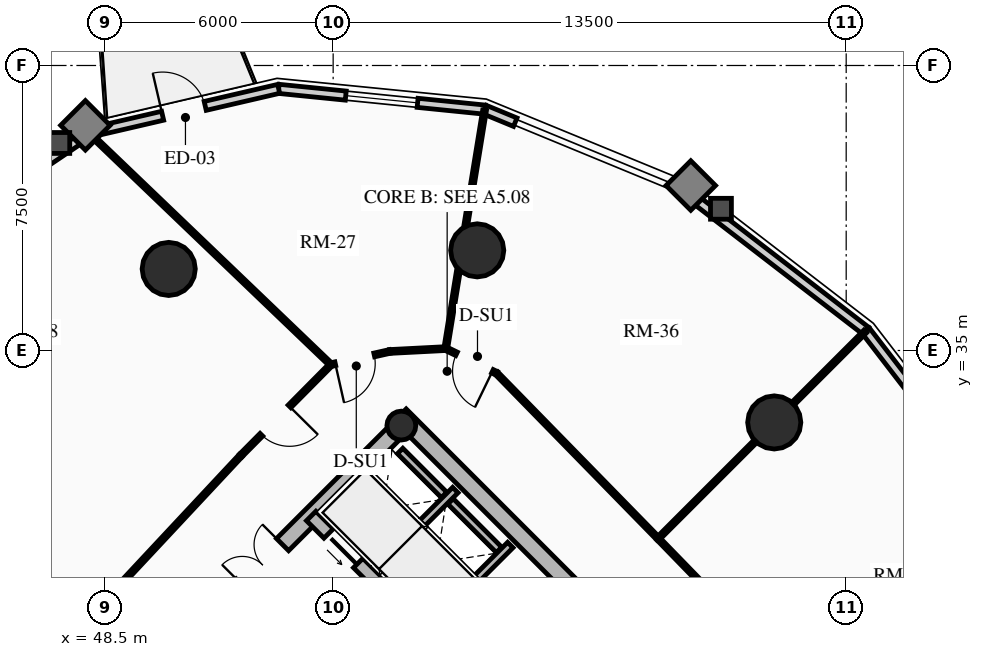
"""IFC4 building model, lengths in metres.
Left out: names, types, materials, properties, quantities, classifications, styles, units other than length and angle.
Written with IfcOpenShell. Run it as: python <this file> out.ifc"""

import sys

from ifc_helpers import new_model, si_unit, direction, frame, frame_2d, origin, origin_2d, place, context, subcontext, project, spatial, rectangle, circle, hollow_circle, extrude, source, transform, mapped, element, fill, save


model = new_model("IFC4")
c1 = context("Model", 3, precision=1e-05, world=origin(), true_north=direction((0.0, 1.0)))
c2 = subcontext(c1, "Body", "Model", "MODEL_VIEW")
j1 = project(units=[si_unit("LENGTHUNIT", "METRE"), si_unit("PLANEANGLEUNIT", "RADIAN")], contexts=[c1])
p1 = place(None, origin())
s1 = spatial("IfcSite", under=j1, at=p1, CompositionType="ELEMENT")
p2 = place(p1, origin())
s2 = spatial("IfcBuilding", under=s1, at=p2, CompositionType="ELEMENT")
p3 = place(p2, frame((0.0, 0.0, 102.16)))
s3 = spatial("IfcBuildingStorey", under=s2, at=p3, CompositionType="ELEMENT", Elevation=102.16)
p4 = place(p3, frame((66.303, 23.263, 0.0), z_axis=(0.0, 0.0, 1.0), x_axis=(-0.707106781187, 0.707106781187, 0.0)))
e1 = element("IfcWall", 1, at=p4, inside=s3, PredefinedType="SHEAR", context=c2, shape_type="SweptSolid", body=[
    extrude(rectangle(XDim=14.2, YDim=0.45, at=frame_2d((7.1, 0.0))), origin(), (0.0, 0.0, 1.0), 2.91),
])
p5 = place(p3, frame((48.856, 25.578, 0.0), z_axis=(0.0, 0.0, 1.0), x_axis=(0.707106781187, 0.707106781187, 0.0)))
e2 = element("IfcWall", 2, at=p5, inside=s3, PredefinedType="SHEAR", context=c2, shape_type="SweptSolid", body=[
    extrude(rectangle(XDim=10.7, YDim=0.45, at=frame_2d((5.35, 0.0))), origin(), (0.0, 0.0, 1.0), 2.91),
])
m1 = source(origin(), c2, "Body", "SweptSolid", [
    extrude(rectangle(XDim=1.5, YDim=2.02, at=frame_2d((0.75, 1.01))), frame((0.0, 0.235, 0.0), z_axis=(0.0, -1.0, 0.0), x_axis=(1.0, 0.0, 0.0)), (0.0, 0.0, 1.0), 0.47),
])
p6 = place(p5, frame((4.6, 0.0, 0.0)))
e3 = element("IfcOpeningElement", 3, at=p6, cuts=e2, PredefinedType="OPENING", context=c2, shape_type="MappedRepresentation", body=[
    mapped(m1, transform((0.0, 0.0, 0.0), x_axis=(1.0, 0.0, 0.0), y_axis=(0.0, 1.0, 0.0), z_axis=(0.0, 0.0, 1.0), scale=1.0)),
])
p7 = place(p3, frame((63.645, 20.922, 0.0), z_axis=(0.0, 0.0, 1.0), x_axis=(-0.707106781187, 0.707106781187, 0.0)))
e4 = element("IfcWall", 4, at=p7, inside=s3, PredefinedType="SHEAR", context=c2, shape_type="SweptSolid", body=[
    extrude(rectangle(XDim=13.75, YDim=0.35, at=frame_2d((6.875, 0.0))), origin(), (0.0, 0.0, 1.0), 2.91),
])
m2 = source(origin(), c2, "Body", "SweptSolid", [
    extrude(rectangle(XDim=1.1, YDim=2.015, at=frame_2d((0.55, 1.007))), frame((0.0, 0.185, 0.0), z_axis=(0.0, -1.0, 0.0), x_axis=(1.0, 0.0, 0.0)), (0.0, 0.0, 1.0), 0.37),
])
p8 = place(p7, frame((10.0, 0.0, 0.0)))
e5 = element("IfcOpeningElement", 5, at=p8, cuts=e4, PredefinedType="OPENING", context=c2, shape_type="MappedRepresentation", body=[
    mapped(m2, transform((0.0, 0.0, 0.0), x_axis=(1.0, 0.0, 0.0), y_axis=(0.0, 1.0, 0.0), z_axis=(0.0, 0.0, 1.0), scale=1.0)),
])
p9 = place(p7, frame((12.0, 0.0, 0.0)))
e6 = element("IfcOpeningElement", 6, at=p9, cuts=e4, PredefinedType="OPENING", context=c2, shape_type="MappedRepresentation", body=[
    mapped(m2, transform((0.0, 0.0, 0.0), x_axis=(1.0, 0.0, 0.0), y_axis=(0.0, 1.0, 0.0), z_axis=(0.0, 0.0, 1.0), scale=1.0)),
])
m3 = source(origin(), c2, "Body", "SweptSolid", [
    extrude(rectangle(XDim=1.15, YDim=2.02, at=frame_2d((0.575, 1.01))), frame((0.0, 0.185, 0.0), z_axis=(0.0, -1.0, 0.0), x_axis=(1.0, 0.0, 0.0)), (0.0, 0.0, 1.0), 0.37),
])
p10 = place(p7, frame((5.305, 0.0, 0.0)))
e7 = element("IfcOpeningElement", 7, at=p10, cuts=e4, PredefinedType="OPENING", context=c2, shape_type="MappedRepresentation", body=[
    mapped(m3, transform((0.0, 0.0, 0.0), x_axis=(1.0, 0.0, 0.0), y_axis=(0.0, 1.0, 0.0), z_axis=(0.0, 0.0, 1.0), scale=1.0)),
])
p11 = place(p3, frame((56.294, 33.024, 0.0), z_axis=(0.0, 0.0, 1.0), x_axis=(0.707106781187, 0.707106781187, 0.0)))
e8 = element("IfcColumn", 8, at=p11, inside=s3, PredefinedType="COLUMN", context=c2, shape_type="SweptSolid", body=[
    extrude(hollow_circle(Radius=0.38, WallThickness=0.032, at=origin_2d()), origin(), (0.0, 0.0, 1.0), 2.91),
])
for number, where, z_axis, x_axis in (
    (9, (66.107, 33.107, 0.0), (0.0, 0.0, 1.0), (1.0, 0.0, 0.0)),
    (10, (58.291, 37.635, 0.0), (0.0, 0.0, 1.0), (1.0, 0.0, 0.0)),
    (11, (50.173, 37.146, 0.0), (0.0, 0.0, 1.0), (1.0, 0.0, 0.0)),
):
    element("IfcColumn", number, at=place(p3, frame(where, z_axis=z_axis, x_axis=x_axis)), inside=s3, PredefinedType="USERDEFINED", context=c2, shape_type="SweptSolid", body=[
        extrude(circle(Radius=0.7, at=origin_2d()), origin(), (0.0, 0.0, 1.0), 2.91),
    ])
p12 = place(p3, frame((63.811, 39.145, 0.0), z_axis=(0.0, 0.0, 1.0), x_axis=(0.791982052206, -0.61054437102, 0.0)))
e12 = element("IfcWall", 12, at=p12, inside=s3, PredefinedType="SOLIDWALL", context=c2, shape_type="SweptSolid", body=[
    extrude(rectangle(XDim=5.942, YDim=0.24, at=frame_2d((2.971, 0.0))), origin(), (0.0, 0.0, 1.0), 2.179),
])
p13 = place(p3, frame((58.487, 41.339, 0.0), z_axis=(0.0, 0.0, 1.0), x_axis=(0.924556017656, -0.381046152345, 0.0)))
e13 = element("IfcWall", 13, at=p13, inside=s3, PredefinedType="SOLIDWALL", context=c2, shape_type="SweptSolid", body=[
    extrude(rectangle(XDim=0.87, YDim=0.24, at=frame_2d((0.435, 0.0))), origin(), (0.0, 0.0, 1.0), 2.179),
])
p14 = place(p3, frame((53.067, 41.885, 0.0), z_axis=(0.0, 0.0, 1.0), x_axis=(0.994971754311, -0.10015591906, 0.0)))
e14 = element("IfcWall", 14, at=p14, inside=s3, PredefinedType="SOLIDWALL", context=c2, shape_type="SweptSolid", body=[
    extrude(rectangle(XDim=5.448, YDim=0.24, at=frame_2d((2.724, 0.0))), origin(), (0.0, 0.0, 1.0), 2.179),
])
m4 = source(origin(), c2, "Body", "SweptSolid", [
    extrude(rectangle(XDim=1.9, YDim=1.35, at=frame_2d((0.95, 0.675))), frame((0.0, 0.13, 0.0), z_axis=(0.0, -1.0, 0.0), x_axis=(1.0, 0.0, 0.0)), (0.0, 0.0, 1.0), 0.26),
])
p15 = place(p14, frame((1.774, 0.0, 0.65)))
e15 = element("IfcOpeningElement", 15, at=p15, cuts=e14, PredefinedType="OPENING", context=c2, shape_type="MappedRepresentation", body=[
    mapped(m4, transform((0.0, 0.0, 0.0), x_axis=(1.0, 0.0, 0.0), y_axis=(0.0, 1.0, 0.0), z_axis=(0.0, 0.0, 1.0), scale=1.0)),
])
p16 = place(p3, frame((48.08, 40.729, 0.0), z_axis=(0.0, 0.0, 1.0), x_axis=(0.974165631126, 0.225834725257, 0.0)))
e16 = element("IfcWall", 16, at=p16, inside=s3, PredefinedType="SOLIDWALL", context=c2, shape_type="SweptSolid", body=[
    extrude(rectangle(XDim=5.119, YDim=0.24, at=frame_2d((2.56, 0.0))), origin(), (0.0, 0.0, 1.0), 2.179),
])
m5 = source(origin(), c2, "Body", "SweptSolid", [
    extrude(rectangle(XDim=1.15, YDim=2.005, at=frame_2d((0.575, 1.002))), frame((0.0, 0.13, 0.0), z_axis=(0.0, -1.0, 0.0), x_axis=(1.0, 0.0, 0.0)), (0.0, 0.0, 1.0), 0.26),
])
p17 = place(p16, frame((1.984, 0.0, 0.0)))
e17 = element("IfcOpeningElement", 17, at=p17, cuts=e16, PredefinedType="OPENING", context=c2, shape_type="MappedRepresentation", body=[
    mapped(m5, transform((0.0, 0.0, 0.0), x_axis=(1.0, 0.0, 0.0), y_axis=(0.0, 1.0, 0.0), z_axis=(0.0, 0.0, 1.0), scale=1.0)),
])
p18 = place(p3, frame((44.015, 37.985, 0.0), z_axis=(0.0, 0.0, 1.0), x_axis=(0.828781148131, 0.559572880421, 0.0)))
e18 = element("IfcWall", 18, at=p18, inside=s3, PredefinedType="SOLIDWALL", context=c2, shape_type="SweptSolid", body=[
    extrude(rectangle(XDim=4.905, YDim=0.24, at=frame_2d((2.452, 0.0))), origin(), (0.0, 0.0, 1.0), 2.179),
])
p19 = place(p3, frame((68.517, 35.517, 0.0), z_axis=(0.0, 0.0, 1.0), x_axis=(0.61054437102, -0.791982052206, 0.0)))
e19 = element("IfcWall", 19, at=p19, inside=s3, PredefinedType="SOLIDWALL", context=c2, shape_type="SweptSolid", body=[
    extrude(rectangle(XDim=5.942, YDim=0.24, at=frame_2d((2.971, 0.0))), origin(), (0.0, 0.0, 1.0), 2.179),
])
m6 = source(origin(), c2, "Body", "SweptSolid", [
    extrude(rectangle(XDim=2.2, YDim=1.35, at=frame_2d((1.1, 0.675))), frame((0.0, 0.13, 0.0), z_axis=(0.0, -1.0, 0.0), x_axis=(1.0, 0.0, 0.0)), (0.0, 0.0, 1.0), 0.26),
])
p20 = place(p19, frame((1.871, 0.0, 0.65)))
e20 = element("IfcOpeningElement", 20, at=p20, cuts=e19, PredefinedType="OPENING", context=c2, shape_type="MappedRepresentation", body=[
    mapped(m6, transform((0.0, 0.0, 0.0), x_axis=(1.0, 0.0, 0.0), y_axis=(0.0, 1.0, 0.0), z_axis=(0.0, 0.0, 1.0), scale=1.0)),
])
p21 = place(p3, frame((57.062, 27.781, 0.0), z_axis=(0.0, 0.0, 1.0), x_axis=(0.707106781187, 0.707106781187, 0.0)))
e21 = element("IfcWall", 21, at=p21, inside=s3, PredefinedType="SHEAR", context=c2, shape_type="SweptSolid", body=[
    extrude(rectangle(XDim=2.97, YDim=0.2, at=frame_2d((1.485, 0.0))), origin(), (0.0, 0.0, 1.0), 2.91),
])
p22 = place(p3, frame((55.615, 29.227, 0.0), z_axis=(0.0, 0.0, 1.0), x_axis=(0.707147878904, 0.70706568108, 0.0)))
e22 = element("IfcWall", 22, at=p22, inside=s3, PredefinedType="SHEAR", context=c2, shape_type="SweptSolid", body=[
    extrude(rectangle(XDim=2.97, YDim=0.2, at=frame_2d((1.485, 0.0))), origin(), (0.0, 0.0, 1.0), 2.91),
])
p23 = place(p3, frame((58.865, 29.754, 0.0), z_axis=(0.0, 0.0, 1.0), x_axis=(-0.707174411312, 0.707039144592, 0.0)))
e23 = element("IfcWall", 23, at=p23, inside=s3, PredefinedType="SHEAR", context=c2, shape_type="SweptSolid", body=[
    extrude(rectangle(XDim=1.805, YDim=0.2, at=frame_2d((0.902, 0.0))), origin(), (0.0, 0.0, 1.0), 2.91),
])
p24 = place(p3, frame((57.419, 31.2, 0.0), z_axis=(0.0, 0.0, 1.0), x_axis=(-0.707032117043, 0.707181437447, 0.0)))
e24 = element("IfcWall", 24, at=p24, inside=s3, PredefinedType="SHEAR", context=c2, shape_type="SweptSolid", body=[
    extrude(rectangle(XDim=1.635, YDim=0.2, at=frame_2d((0.817, 0.0))), origin(), (0.0, 0.0, 1.0), 2.91),
])
p25 = place(p3, frame((63.051, 30.051, 0.0), z_axis=(0.0, 0.0, 1.0), x_axis=(-0.698911483116, 0.715208178622, 0.0)))
e25 = element("IfcWall", 25, at=p25, inside=s3, PredefinedType="MOVABLE", context=c2, shape_type="SweptSolid", body=[
    extrude(rectangle(XDim=6.082, YDim=0.1, at=frame_2d((3.041, 0.0))), origin(), (0.0, 0.0, 1.0), 2.225),
])
p26 = place(p3, frame((58.8, 34.401, 0.0), z_axis=(0.0, 0.0, 1.0), x_axis=(-0.899620612635, 0.436672363818, 0.0)))
e26 = element("IfcWall", 26, at=p26, inside=s3, PredefinedType="MOVABLE", context=c2, shape_type="SweptSolid", body=[
    extrude(rectangle(XDim=1.487, YDim=0.1, at=frame_2d((0.743, 0.0))), origin(), (0.0, 0.0, 1.0), 2.225),
])
m7 = source(origin(), c2, "Body", "SweptSolid", [
    extrude(rectangle(XDim=1.05, YDim=2.015, at=frame_2d((0.525, 1.007))), frame((0.0, 0.06, 0.0), z_axis=(0.0, -1.0, 0.0), x_axis=(1.0, 0.0, 0.0)), (0.0, 0.0, 1.0), 0.12),
])
p27 = place(p26, frame((0.12, 0.0, 0.0)))
e27 = element("IfcOpeningElement", 27, at=p27, cuts=e26, PredefinedType="OPENING", context=c2, shape_type="MappedRepresentation", body=[
    mapped(m7, transform((0.0, 0.0, 0.0), x_axis=(1.0, 0.0, 0.0), y_axis=(0.0, 1.0, 0.0), z_axis=(0.0, 0.0, 1.0), scale=1.0)),
])
p28 = place(p3, frame((57.462, 35.05, 0.0), z_axis=(0.0, 0.0, 1.0), x_axis=(-0.998677016607, -0.051421945723, 0.0)))
e28 = element("IfcWall", 28, at=p28, inside=s3, PredefinedType="MOVABLE", context=c2, shape_type="SweptSolid", body=[
    extrude(rectangle(XDim=1.477, YDim=0.1, at=frame_2d((0.738, 0.0))), origin(), (0.0, 0.0, 1.0), 2.225),
])
p29 = place(p3, frame((55.988, 34.974, 0.0), z_axis=(0.0, 0.0, 1.0), x_axis=(-0.975666565154, -0.219259557695, 0.0)))
e29 = element("IfcWall", 29, at=p29, inside=s3, PredefinedType="MOVABLE", context=c2, shape_type="SweptSolid", body=[
    extrude(rectangle(XDim=1.587, YDim=0.1, at=frame_2d((0.793, 0.0))), origin(), (0.0, 0.0, 1.0), 2.225),
])
p30 = place(p29, frame((0.417, 0.0, 0.0)))
e30 = element("IfcOpeningElement", 30, at=p30, cuts=e29, PredefinedType="OPENING", context=c2, shape_type="MappedRepresentation", body=[
    mapped(m7, transform((0.0, 0.0, 0.0), x_axis=(1.0, 0.0, 0.0), y_axis=(0.0, 1.0, 0.0), z_axis=(0.0, 0.0, 1.0), scale=1.0)),
])
p31 = place(p3, frame((54.44, 34.626, 0.0), z_axis=(0.0, 0.0, 1.0), x_axis=(-0.703978840546, -0.710220945948, 0.0)))
e31 = element("IfcWall", 31, at=p31, inside=s3, PredefinedType="MOVABLE", context=c2, shape_type="SweptSolid", body=[
    extrude(rectangle(XDim=3.364, YDim=0.1, at=frame_2d((1.682, 0.0))), origin(), (0.0, 0.0, 1.0), 2.225),
])
p32 = place(p31, frame((1.546, 0.0, 0.0)))
e32 = element("IfcOpeningElement", 32, at=p32, cuts=e31, PredefinedType="OPENING", context=c2, shape_type="MappedRepresentation", body=[
    mapped(m7, transform((0.0, 0.0, 0.0), x_axis=(1.0, 0.0, 0.0), y_axis=(0.0, 1.0, 0.0), z_axis=(0.0, 0.0, 1.0), scale=1.0)),
])
p33 = place(p3, frame((52.072, 32.237, 0.0), z_axis=(0.0, 0.0, 1.0), x_axis=(-0.682528774423, -0.730858722383, 0.0)))
e33 = element("IfcWall", 33, at=p33, inside=s3, PredefinedType="MOVABLE", context=c2, shape_type="SweptSolid", body=[
    extrude(rectangle(XDim=6.486, YDim=0.1, at=frame_2d((3.243, 0.0))), origin(), (0.0, 0.0, 1.0), 2.225),
])
p34 = place(p3, frame((67.213, 25.768, 0.0), z_axis=(0.0, 0.0, 1.0), x_axis=(-0.696916079748, 0.717152687918, 0.0)))
e34 = element("IfcWall", 34, at=p34, inside=s3, PredefinedType="MOVABLE", context=c2, shape_type="SweptSolid", body=[
    extrude(rectangle(XDim=5.972, YDim=0.1, at=frame_2d((2.986, 0.0))), origin(), (0.0, 0.0, 1.0), 2.655),
])
m8 = source(origin(), c2, "Body", "SweptSolid", [
    extrude(rectangle(XDim=1.0, YDim=2.015, at=frame_2d((0.5, 1.007))), frame((0.0, 0.06, 0.0), z_axis=(0.0, -1.0, 0.0), x_axis=(1.0, 0.0, 0.0)), (0.0, 0.0, 1.0), 0.12),
])
p35 = place(p34, frame((2.486, 0.0, 0.0)))
e35 = element("IfcOpeningElement", 35, at=p35, cuts=e34, PredefinedType="OPENING", context=c2, shape_type="MappedRepresentation", body=[
    mapped(m8, transform((0.0, 0.0, 0.0), x_axis=(1.0, 0.0, 0.0), y_axis=(0.0, 1.0, 0.0), z_axis=(0.0, 0.0, 1.0), scale=1.0)),
])
p36 = place(p3, frame((63.051, 30.051, 0.0), z_axis=(0.0, 0.0, 1.0), x_axis=(0.707106781187, 0.707106781187, 0.0)))
e36 = element("IfcWall", 36, at=p36, inside=s3, PredefinedType="MOVABLE", context=c2, shape_type="SweptSolid", body=[
    extrude(rectangle(XDim=7.711, YDim=0.1, at=frame_2d((3.855, 0.0))), origin(), (0.0, 0.0, 1.0), 2.179),
])
p37 = place(p3, frame((57.462, 35.05, 0.0), z_axis=(0.0, 0.0, 1.0), x_axis=(0.160845392798, 0.98697961459, 0.0)))
e37 = element("IfcWall", 37, at=p37, inside=s3, PredefinedType="MOVABLE", context=c2, shape_type="SweptSolid", body=[
    extrude(rectangle(XDim=6.352, YDim=0.1, at=frame_2d((3.176, 0.0))), origin(), (0.0, 0.0, 1.0), 2.179),
])
p38 = place(p3, frame((54.44, 34.626, 0.0), z_axis=(0.0, 0.0, 1.0), x_axis=(-0.722045979822, 0.691845071547, 0.0)))
e38 = element("IfcWall", 38, at=p38, inside=s3, PredefinedType="MOVABLE", context=c2, shape_type="SweptSolid", body=[
    extrude(rectangle(XDim=8.795, YDim=0.1, at=frame_2d((4.397, 0.0))), origin(), (0.0, 0.0, 1.0), 2.179),
])
m9 = source(origin(), c2, "Body", "SweptSolid", [
    extrude(rectangle(XDim=1.9, YDim=1.35, at=frame_2d((0.95, 0.675))), frame((0.0, 0.03, 0.0), z_axis=(0.0, -1.0, 0.0), x_axis=(1.0, 0.0, 0.0)), (0.0, 0.0, 1.0), 0.06),
])
p39 = place(p15, origin())
e39 = element("IfcWindow", 39, at=p39, inside=s3, PartitioningType="DOUBLE_PANEL_VERTICAL", PredefinedType="WINDOW", context=c2, shape_type="MappedRepresentation", body=[
    mapped(m9, transform((0.0, 0.0, 0.0), x_axis=(1.0, 0.0, 0.0), y_axis=(0.0, 1.0, 0.0), z_axis=(0.0, 0.0, 1.0), scale=1.0)),
])
fill(e15, e39)
m10 = source(origin(), c2, "Body", "SweptSolid", [
    extrude(rectangle(XDim=1.15, YDim=2.005, at=frame_2d((0.575, 1.002))), frame((0.0, 0.025, 0.0), z_axis=(0.0, -1.0, 0.0), x_axis=(1.0, 0.0, 0.0)), (0.0, 0.0, 1.0), 0.05),
])
p40 = place(p17, origin())
e40 = element("IfcDoor", 40, at=p40, inside=s3, OperationType="SINGLE_SWING_LEFT", PredefinedType="DOOR", context=c2, shape_type="MappedRepresentation", body=[
    mapped(m10, transform((0.0, 0.0, 0.0), x_axis=(1.0, 0.0, 0.0), y_axis=(0.0, 1.0, 0.0), z_axis=(0.0, 0.0, 1.0), scale=1.0)),
])
fill(e17, e40)
m11 = source(origin(), c2, "Body", "SweptSolid", [
    extrude(rectangle(XDim=1.1, YDim=2.015, at=frame_2d((0.55, 1.007))), frame((0.0, 0.025, 0.0), z_axis=(0.0, -1.0, 0.0), x_axis=(1.0, 0.0, 0.0)), (0.0, 0.0, 1.0), 0.05),
])
p41 = place(p9, origin())
e41 = element("IfcDoor", 41, at=p41, inside=s3, OperationType="SLIDING_TO_LEFT", PredefinedType="DOOR", context=c2, shape_type="MappedRepresentation", body=[
    mapped(m11, transform((0.0, 0.0, 0.0), x_axis=(1.0, 0.0, 0.0), y_axis=(0.0, 1.0, 0.0), z_axis=(0.0, 0.0, 1.0), scale=1.0)),
])
fill(e6, e41)
m12 = source(origin(), c2, "Body", "SweptSolid", [
    extrude(rectangle(XDim=1.5, YDim=2.02, at=frame_2d((0.75, 1.01))), frame((0.0, 0.025, 0.0), z_axis=(0.0, -1.0, 0.0), x_axis=(1.0, 0.0, 0.0)), (0.0, 0.0, 1.0), 0.05),
])
p42 = place(p6, origin())
e42 = element("IfcDoor", 42, at=p42, inside=s3, OperationType="DOUBLE_DOOR_SINGLE_SWING", PredefinedType="DOOR", context=c2, shape_type="MappedRepresentation", body=[
    mapped(m12, transform((0.0, 0.0, 0.0), x_axis=(1.0, 0.0, 0.0), y_axis=(0.0, 1.0, 0.0), z_axis=(0.0, 0.0, 1.0), scale=1.0)),
])
fill(e3, e42)
m13 = source(origin(), c2, "Body", "SweptSolid", [
    extrude(rectangle(XDim=1.05, YDim=2.015, at=frame_2d((0.525, 1.007))), frame((0.0, 0.025, 0.0), z_axis=(0.0, -1.0, 0.0), x_axis=(1.0, 0.0, 0.0)), (0.0, 0.0, 1.0), 0.05),
])
p43 = place(p30, origin())
e43 = element("IfcDoor", 43, at=p43, inside=s3, OperationType="SINGLE_SWING_RIGHT", PredefinedType="DOOR", context=c2, shape_type="MappedRepresentation", body=[
    mapped(m13, transform((0.0, 0.0, 0.0), x_axis=(1.0, 0.0, 0.0), y_axis=(0.0, 1.0, 0.0), z_axis=(0.0, 0.0, 1.0), scale=1.0)),
])
fill(e30, e43)
p44 = place(p32, origin())
e44 = element("IfcDoor", 44, at=p44, inside=s3, OperationType="SINGLE_SWING_LEFT", PredefinedType="DOOR", context=c2, shape_type="MappedRepresentation", body=[
    mapped(m13, transform((0.0, 0.0, 0.0), x_axis=(1.0, 0.0, 0.0), y_axis=(0.0, 1.0, 0.0), z_axis=(0.0, 0.0, 1.0), scale=1.0)),
])
fill(e32, e44)
p45 = place(p27, origin())
e45 = element("IfcDoor", 45, at=p45, inside=s3, OperationType="SINGLE_SWING_LEFT", PredefinedType="DOOR", context=c2, shape_type="MappedRepresentation", body=[
    mapped(m13, transform((0.0, 0.0, 0.0), x_axis=(1.0, 0.0, 0.0), y_axis=(0.0, 1.0, 0.0), z_axis=(0.0, 0.0, 1.0), scale=1.0)),
])
fill(e27, e45)
save(model, sys.argv[1])
